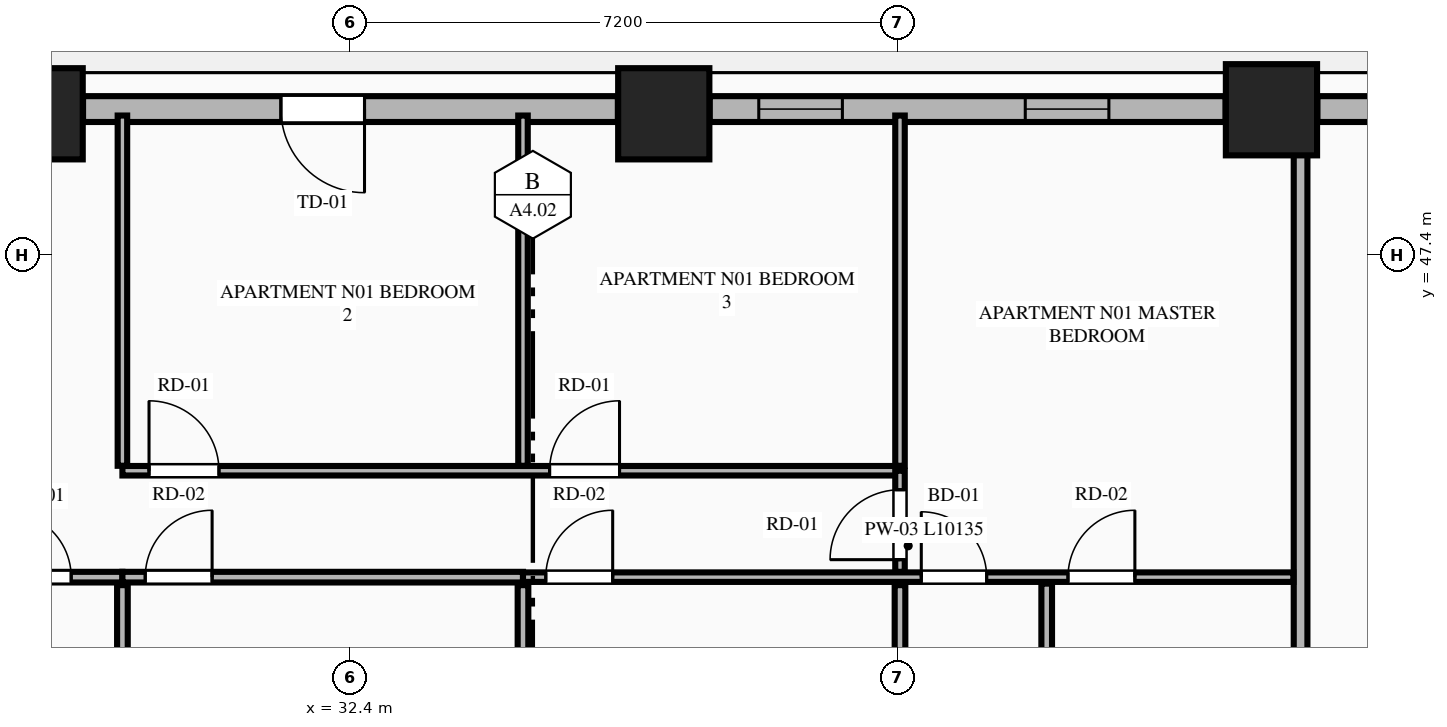
"""IFC4 building model, lengths in metres.
Left out: names, types, materials, properties, quantities, classifications, styles, units other than length and angle.
Written with IfcOpenShell. Run it as: python <this file> out.ifc"""

import sys

from ifc_helpers import new_model, si_unit, direction, frame, frame_2d, origin, origin_2d, place, context, subcontext, project, spatial, rectangle, extrude, element, fill, save


model = new_model("IFC4")
c1 = context("Model", 3, precision=1e-05, world=origin(), true_north=direction((0.0, 1.0)))
c2 = subcontext(c1, "Body", "Model", "MODEL_VIEW")
j1 = project(units=[si_unit("LENGTHUNIT", "METRE"), si_unit("PLANEANGLEUNIT", "RADIAN")], contexts=[c1])
p1 = place(None, origin())
s1 = spatial("IfcSite", under=j1, at=p1, CompositionType="ELEMENT")
p2 = place(p1, origin())
s2 = spatial("IfcBuilding", under=s1, at=p2, CompositionType="ELEMENT")
p3 = place(p2, frame((0.0, 0.0, 42.65)))
s3 = spatial("IfcBuildingStorey", under=s2, at=p3, CompositionType="ELEMENT", Elevation=42.65)
for number, where, z_axis, x_axis in (
    (1, (44.517, 49.311, 0.0), (0.0, 0.0, 1.0), (1.0, 0.0, 0.0)),
    (2, (36.522, 49.258, 0.0), (0.0, 0.0, 1.0), (1.0, 0.0, 0.0)),
    (3, (28.278, 49.258, 0.0), (0.0, 0.0, 1.0), (1.0, 0.0, 0.0)),
):
    element("IfcColumn", number, at=place(p3, frame(where, z_axis=z_axis, x_axis=x_axis)), inside=s3, PredefinedType="COLUMN", context=c2, shape_type="SweptSolid", body=[
        extrude(rectangle(XDim=1.2, YDim=1.2, at=origin_2d()), origin(), (0.0, 0.0, 1.0), 3.55),
    ])
p4 = place(p3, frame((46.366, 49.32, 0.0), z_axis=(0.0, 0.0, 1.0), x_axis=(-1.0, 0.0, 0.0)))
e4 = element("IfcWall", 4, at=p4, inside=s3, PredefinedType="STANDARD", context=c2, shape_type="SweptSolid", body=[
    extrude(rectangle(XDim=1.245, YDim=0.34, at=frame_2d((0.623, 0.0))), origin(), (0.0, 0.0, 1.0), 3.33),
])
p5 = place(p3, frame((43.913, 49.32, 0.0), z_axis=(0.0, 0.0, 1.0), x_axis=(-1.0, 0.0, 0.0)))
e5 = element("IfcWall", 5, at=p5, inside=s3, PredefinedType="STANDARD", context=c2, shape_type="SweptSolid", body=[
    extrude(rectangle(XDim=6.787, YDim=0.34, at=frame_2d((3.394, 0.0))), origin(), (0.0, 0.0, 1.0), 2.787),
])
p6 = place(p5, frame((1.535, 0.0, 0.75)))
e6 = element("IfcOpeningElement", 6, at=p6, cuts=e5, PredefinedType="OPENING", context=c2, shape_type="SweptSolid", body=[
    extrude(rectangle(XDim=1.1, YDim=1.887, at=frame_2d((0.55, 0.943))), frame((0.0, 0.18, 0.0), z_axis=(0.0, -1.0, 0.0), x_axis=(1.0, 0.0, 0.0)), (0.0, 0.0, 1.0), 0.36),
])
p7 = place(p5, frame((5.041, 0.0, 0.75)))
e7 = element("IfcOpeningElement", 7, at=p7, cuts=e5, PredefinedType="OPENING", context=c2, shape_type="SweptSolid", body=[
    extrude(rectangle(XDim=1.1, YDim=1.887, at=frame_2d((0.55, 0.943))), frame((0.0, 0.18, 0.0), z_axis=(0.0, -1.0, 0.0), x_axis=(1.0, 0.0, 0.0)), (0.0, 0.0, 1.0), 0.36),
])
p8 = place(p3, frame((35.918, 49.32, 0.0), z_axis=(0.0, 0.0, 1.0), x_axis=(-1.0, 0.0, 0.0)))
e8 = element("IfcWall", 8, at=p8, inside=s3, PredefinedType="STANDARD", context=c2, shape_type="SweptSolid", body=[
    extrude(rectangle(XDim=7.036, YDim=0.34, at=frame_2d((3.518, 0.0))), origin(), (0.0, 0.0, 1.0), 2.787),
])
p9 = place(p8, frame((3.333, 0.0, 0.0)))
e9 = element("IfcOpeningElement", 9, at=p9, cuts=e8, PredefinedType="OPENING", context=c2, shape_type="SweptSolid", body=[
    extrude(rectangle(XDim=1.1, YDim=2.25, at=frame_2d((0.55, 1.125))), frame((0.0, 0.18, 0.0), z_axis=(0.0, -1.0, 0.0), x_axis=(1.0, 0.0, 0.0)), (0.0, 0.0, 1.0), 0.36),
])
p10 = place(p3, frame((44.9, 35.85, 0.0), z_axis=(0.0, 0.0, 1.0), x_axis=(0.0, 1.0, 0.0)))
e10 = element("IfcWall", 10, at=p10, inside=s3, PredefinedType="PARTITIONING", context=c2, shape_type="SweptSolid", body=[
    extrude(rectangle(XDim=13.295, YDim=0.18, at=frame_2d((6.647, 0.0))), origin(), (0.0, 0.0, 1.0), 3.33),
])
p11 = place(p3, frame((22.25, 43.162, 0.0), z_axis=(0.0, 0.0, 1.0), x_axis=(1.0, 0.0, 0.0)))
e11 = element("IfcWall", 11, at=p11, inside=s3, PredefinedType="PLUMBINGWALL", context=c2, shape_type="SweptSolid", body=[
    extrude(rectangle(XDim=7.15, YDim=0.14, at=frame_2d((3.575, 0.0))), origin(), (0.0, 0.0, 1.0), 3.33),
])
p12 = place(p11, frame((5.616, 0.0, 0.0)))
e12 = element("IfcOpeningElement", 12, at=p12, cuts=e11, PredefinedType="OPENING", context=c2, shape_type="SweptSolid", body=[
    extrude(rectangle(XDim=0.86, YDim=2.1, at=frame_2d((0.43, 1.05))), frame((0.0, 0.08, 0.0), z_axis=(0.0, -1.0, 0.0), x_axis=(1.0, 0.0, 0.0)), (0.0, 0.0, 1.0), 0.16),
])
p13 = place(p11, frame((0.26, 0.0, 0.0)))
e13 = element("IfcOpeningElement", 13, at=p13, cuts=e11, PredefinedType="OPENING", context=c2, shape_type="SweptSolid", body=[
    extrude(rectangle(XDim=0.88, YDim=2.15, at=frame_2d((0.44, 1.075))), frame((0.0, 0.08, 0.0), z_axis=(0.0, -1.0, 0.0), x_axis=(1.0, 0.0, 0.0)), (0.0, 0.0, 1.0), 0.16),
])
p14 = place(p11, frame((3.385, 0.0, 0.0)))
e14 = element("IfcOpeningElement", 14, at=p14, cuts=e11, PredefinedType="OPENING", context=c2, shape_type="SweptSolid", body=[
    extrude(rectangle(XDim=0.88, YDim=2.15, at=frame_2d((0.44, 1.075))), frame((0.0, 0.08, 0.0), z_axis=(0.0, -1.0, 0.0), x_axis=(1.0, 0.0, 0.0)), (0.0, 0.0, 1.0), 0.16),
])
p15 = place(p3, frame((29.4, 43.162, 0.0), z_axis=(0.0, 0.0, 1.0), x_axis=(1.0, 0.0, 0.0)))
e15 = element("IfcWall", 15, at=p15, inside=s3, PredefinedType="PLUMBINGWALL", context=c2, shape_type="SweptSolid", body=[
    extrude(rectangle(XDim=5.27, YDim=0.14, at=frame_2d((2.635, 0.0))), origin(), (0.0, 0.0, 1.0), 3.33),
])
p16 = place(p15, frame((0.3, 0.0, 0.0)))
e16 = element("IfcOpeningElement", 16, at=p16, cuts=e15, PredefinedType="OPENING", context=c2, shape_type="SweptSolid", body=[
    extrude(rectangle(XDim=0.88, YDim=2.15, at=frame_2d((0.44, 1.075))), frame((0.0, 0.08, 0.0), z_axis=(0.0, -1.0, 0.0), x_axis=(1.0, 0.0, 0.0)), (0.0, 0.0, 1.0), 0.16),
])
p17 = place(p3, frame((34.67, 43.162, 0.0), z_axis=(0.0, 0.0, 1.0), x_axis=(1.0, 0.0, 0.0)))
e17 = element("IfcWall", 17, at=p17, inside=s3, PredefinedType="PARTITIONING", context=c2, shape_type="SweptSolid", body=[
    extrude(rectangle(XDim=10.135, YDim=0.125, at=frame_2d((5.067, 0.0))), origin(), (0.0, 0.0, 1.0), 3.33),
])
p18 = place(p17, frame((5.24, 0.0, 0.0)))
e18 = element("IfcOpeningElement", 18, at=p18, cuts=e17, PredefinedType="OPENING", context=c2, shape_type="SweptSolid", body=[
    extrude(rectangle(XDim=0.86, YDim=2.1, at=frame_2d((0.43, 1.05))), frame((0.0, 0.073, 0.0), z_axis=(0.0, -1.0, 0.0), x_axis=(1.0, 0.0, 0.0)), (0.0, 0.0, 1.0), 0.145),
])
p19 = place(p17, frame((7.17, 0.0, 0.0)))
e19 = element("IfcOpeningElement", 19, at=p19, cuts=e17, PredefinedType="OPENING", context=c2, shape_type="SweptSolid", body=[
    extrude(rectangle(XDim=0.88, YDim=2.15, at=frame_2d((0.44, 1.075))), frame((0.0, 0.073, 0.0), z_axis=(0.0, -1.0, 0.0), x_axis=(1.0, 0.0, 0.0)), (0.0, 0.0, 1.0), 0.145),
])
p20 = place(p17, frame((0.3, 0.0, 0.0)))
e20 = element("IfcOpeningElement", 20, at=p20, cuts=e17, PredefinedType="OPENING", context=c2, shape_type="SweptSolid", body=[
    extrude(rectangle(XDim=0.88, YDim=2.15, at=frame_2d((0.44, 1.075))), frame((0.0, 0.073, 0.0), z_axis=(0.0, -1.0, 0.0), x_axis=(1.0, 0.0, 0.0)), (0.0, 0.0, 1.0), 0.145),
])
p21 = place(p3, frame((29.4, 44.627, 0.0), z_axis=(0.0, 0.0, 1.0), x_axis=(0.0, 1.0, 0.0)))
e21 = element("IfcWall", 21, at=p21, inside=s3, PredefinedType="PARTITIONING", context=c2, shape_type="SweptSolid", body=[
    extrude(rectangle(XDim=4.608, YDim=0.125, at=frame_2d((2.304, 0.0))), origin(), (0.0, 0.0, 1.0), 3.33),
])
p22 = place(p3, frame((29.4, 44.562, 0.0), z_axis=(0.0, 0.0, 1.0), x_axis=(1.0, 0.0, 0.0)))
e22 = element("IfcWall", 22, at=p22, inside=s3, PredefinedType="PARTITIONING", context=c2, shape_type="SweptSolid", body=[
    extrude(rectangle(XDim=10.23, YDim=0.125, at=frame_2d((5.115, 0.0))), origin(), (0.0, 0.0, 1.0), 3.33),
])
p23 = place(p22, frame((0.35, 0.0, 0.0)))
e23 = element("IfcOpeningElement", 23, at=p23, cuts=e22, PredefinedType="OPENING", context=c2, shape_type="SweptSolid", body=[
    extrude(rectangle(XDim=0.92, YDim=2.15, at=frame_2d((0.46, 1.075))), frame((0.0, 0.073, 0.0), z_axis=(0.0, -1.0, 0.0), x_axis=(1.0, 0.0, 0.0)), (0.0, 0.0, 1.0), 0.145),
])
p24 = place(p22, frame((5.62, 0.0, 0.0)))
e24 = element("IfcOpeningElement", 24, at=p24, cuts=e22, PredefinedType="OPENING", context=c2, shape_type="SweptSolid", body=[
    extrude(rectangle(XDim=0.92, YDim=2.15, at=frame_2d((0.46, 1.075))), frame((0.0, 0.073, 0.0), z_axis=(0.0, -1.0, 0.0), x_axis=(1.0, 0.0, 0.0)), (0.0, 0.0, 1.0), 0.145),
])
p25 = place(p3, frame((39.63, 43.232, 0.0), z_axis=(0.0, 0.0, 1.0), x_axis=(0.0, 1.0, 0.0)))
e25 = element("IfcWall", 25, at=p25, inside=s3, PredefinedType="PARTITIONING", context=c2, shape_type="SweptSolid", body=[
    extrude(rectangle(XDim=1.33, YDim=0.125, at=frame_2d((0.665, 0.0))), origin(), (0.0, 0.0, 1.0), 3.33),
])
p26 = place(p25, frame((0.16, 0.0, 0.0)))
e26 = element("IfcOpeningElement", 26, at=p26, cuts=e25, PredefinedType="OPENING", context=c2, shape_type="SweptSolid", body=[
    extrude(rectangle(XDim=0.92, YDim=2.15, at=frame_2d((0.46, 1.075))), frame((0.0, 0.073, 0.0), z_axis=(0.0, -1.0, 0.0), x_axis=(1.0, 0.0, 0.0)), (0.0, 0.0, 1.0), 0.145),
])
for number, where, z_axis, x_axis in (
    (27, (29.4, 35.935, 0.0), (0.0, 0.0, 1.0), (0.0, 1.0, 0.0)),
    (28, (34.67, 35.935, 0.0), (0.0, 0.0, 1.0), (0.0, 1.0, 0.0)),
):
    element("IfcWall", number, at=place(p3, frame(where, z_axis=z_axis, x_axis=x_axis)), inside=s3, PredefinedType="PLUMBINGWALL", context=c2, shape_type="SweptSolid", body=[
        extrude(rectangle(XDim=7.122, YDim=0.14, at=frame_2d((3.561, 0.0))), origin(), (0.0, 0.0, 1.0), 3.33),
    ])
for number, where, z_axis, x_axis in (
    (29, (34.67, 44.627, 0.0), (0.0, 0.0, 1.0), (0.0, 1.0, 0.0)),
    (30, (39.63, 44.627, 0.0), (0.0, 0.0, 1.0), (0.0, 1.0, 0.0)),
):
    element("IfcWall", number, at=place(p3, frame(where, z_axis=z_axis, x_axis=x_axis)), inside=s3, PredefinedType="PARTITIONING", context=c2, shape_type="SweptSolid", body=[
        extrude(rectangle(XDim=4.608, YDim=0.125, at=frame_2d((2.304, 0.0))), origin(), (0.0, 0.0, 1.0), 3.33),
    ])
p27 = place(p3, frame((39.63, 35.935, 0.0), z_axis=(0.0, 0.0, 1.0), x_axis=(0.0, 1.0, 0.0)))
e31 = element("IfcWall", 31, at=p27, inside=s3, PredefinedType="PLUMBINGWALL", context=c2, shape_type="SweptSolid", body=[
    extrude(rectangle(XDim=7.122, YDim=0.14, at=frame_2d((3.561, 0.0))), origin(), (0.0, 0.0, 1.0), 3.33),
])
p28 = place(p3, frame((41.56, 35.935, 0.0), z_axis=(0.0, 0.0, 1.0), x_axis=(0.0, 1.0, 0.0)))
e32 = element("IfcWall", 32, at=p28, inside=s3, PredefinedType="PLUMBINGWALL", context=c2, shape_type="SweptSolid", body=[
    extrude(rectangle(XDim=7.142, YDim=0.14, at=frame_2d((3.571, 0.0))), origin(), (0.0, 0.0, 1.0), 3.33),
])
p29 = place(p6, origin())
e33 = element("IfcWindow", 33, at=p29, inside=s3, PartitioningType="SINGLE_PANEL", PredefinedType="WINDOW", context=c2, shape_type="SweptSolid", body=[
    extrude(rectangle(XDim=1.1, YDim=1.887, at=frame_2d((0.55, 0.943))), frame((0.0, 0.03, 0.0), z_axis=(0.0, -1.0, 0.0), x_axis=(1.0, 0.0, 0.0)), (0.0, 0.0, 1.0), 0.06),
])
fill(e6, e33)
p30 = place(p9, origin())
e34 = element("IfcDoor", 34, at=p30, inside=s3, OperationType="SINGLE_SWING_LEFT", PredefinedType="DOOR", context=c2, shape_type="SweptSolid", body=[
    extrude(rectangle(XDim=1.1, YDim=2.25, at=frame_2d((0.55, 1.125))), frame((0.0, 0.025, 0.0), z_axis=(0.0, -1.0, 0.0), x_axis=(1.0, 0.0, 0.0)), (0.0, 0.0, 1.0), 0.05),
])
fill(e9, e34)
p31 = place(p12, origin())
e35 = element("IfcDoor", 35, at=p31, inside=s3, OperationType="SINGLE_SWING_LEFT", PredefinedType="DOOR", context=c2, shape_type="SweptSolid", body=[
    extrude(rectangle(XDim=0.86, YDim=2.1, at=frame_2d((0.43, 1.05))), frame((0.0, 0.025, 0.0), z_axis=(0.0, -1.0, 0.0), x_axis=(1.0, 0.0, 0.0)), (0.0, 0.0, 1.0), 0.05),
])
fill(e12, e35)
p32 = place(p18, origin())
e36 = element("IfcDoor", 36, at=p32, inside=s3, OperationType="SINGLE_SWING_LEFT", PredefinedType="DOOR", context=c2, shape_type="SweptSolid", body=[
    extrude(rectangle(XDim=0.86, YDim=2.1, at=frame_2d((0.43, 1.05))), frame((0.0, 0.025, 0.0), z_axis=(0.0, -1.0, 0.0), x_axis=(1.0, 0.0, 0.0)), (0.0, 0.0, 1.0), 0.05),
])
fill(e18, e36)
p33 = place(p19, origin())
e37 = element("IfcDoor", 37, at=p33, inside=s3, OperationType="SINGLE_SWING_RIGHT", PredefinedType="DOOR", context=c2, shape_type="SweptSolid", body=[
    extrude(rectangle(XDim=0.88, YDim=2.15, at=frame_2d((0.44, 1.075))), frame((0.0, 0.025, 0.0), z_axis=(0.0, -1.0, 0.0), x_axis=(1.0, 0.0, 0.0)), (0.0, 0.0, 1.0), 0.05),
])
fill(e19, e37)
p34 = place(p16, origin())
e38 = element("IfcDoor", 38, at=p34, inside=s3, OperationType="SINGLE_SWING_RIGHT", PredefinedType="DOOR", context=c2, shape_type="SweptSolid", body=[
    extrude(rectangle(XDim=0.88, YDim=2.15, at=frame_2d((0.44, 1.075))), frame((0.0, 0.025, 0.0), z_axis=(0.0, -1.0, 0.0), x_axis=(1.0, 0.0, 0.0)), (0.0, 0.0, 1.0), 0.05),
])
fill(e16, e38)
p35 = place(p23, origin())
e39 = element("IfcDoor", 39, at=p35, inside=s3, OperationType="SINGLE_SWING_LEFT", PredefinedType="DOOR", context=c2, shape_type="SweptSolid", body=[
    extrude(rectangle(XDim=0.92, YDim=2.15, at=frame_2d((0.46, 1.075))), frame((0.0, 0.025, 0.0), z_axis=(0.0, -1.0, 0.0), x_axis=(1.0, 0.0, 0.0)), (0.0, 0.0, 1.0), 0.05),
])
fill(e23, e39)
p36 = place(p24, origin())
e40 = element("IfcDoor", 40, at=p36, inside=s3, OperationType="SINGLE_SWING_RIGHT", PredefinedType="DOOR", context=c2, shape_type="SweptSolid", body=[
    extrude(rectangle(XDim=0.92, YDim=2.15, at=frame_2d((0.46, 1.075))), frame((0.0, 0.025, 0.0), z_axis=(0.0, -1.0, 0.0), x_axis=(1.0, 0.0, 0.0)), (0.0, 0.0, 1.0), 0.05),
])
fill(e24, e40)
p37 = place(p26, origin())
e41 = element("IfcDoor", 41, at=p37, inside=s3, OperationType="SINGLE_SWING_LEFT", PredefinedType="DOOR", context=c2, shape_type="SweptSolid", body=[
    extrude(rectangle(XDim=0.92, YDim=2.15, at=frame_2d((0.46, 1.075))), frame((0.0, 0.025, 0.0), z_axis=(0.0, -1.0, 0.0), x_axis=(1.0, 0.0, 0.0)), (0.0, 0.0, 1.0), 0.05),
])
fill(e26, e41)
p38 = place(p20, origin())
e42 = element("IfcDoor", 42, at=p38, inside=s3, OperationType="SINGLE_SWING_RIGHT", PredefinedType="DOOR", context=c2, shape_type="SweptSolid", body=[
    extrude(rectangle(XDim=0.88, YDim=2.15, at=frame_2d((0.44, 1.075))), frame((0.0, 0.025, 0.0), z_axis=(0.0, -1.0, 0.0), x_axis=(1.0, 0.0, 0.0)), (0.0, 0.0, 1.0), 0.05),
])
fill(e20, e42)
p39 = place(p7, origin())
e43 = element("IfcWindow", 43, at=p39, inside=s3, PartitioningType="SINGLE_PANEL", PredefinedType="WINDOW", context=c2, shape_type="SweptSolid", body=[
    extrude(rectangle(XDim=1.1, YDim=1.887, at=frame_2d((0.55, 0.943))), frame((0.0, 0.03, 0.0), z_axis=(0.0, -1.0, 0.0), x_axis=(1.0, 0.0, 0.0)), (0.0, 0.0, 1.0), 0.06),
])
fill(e7, e43)
save(model, sys.argv[1])
